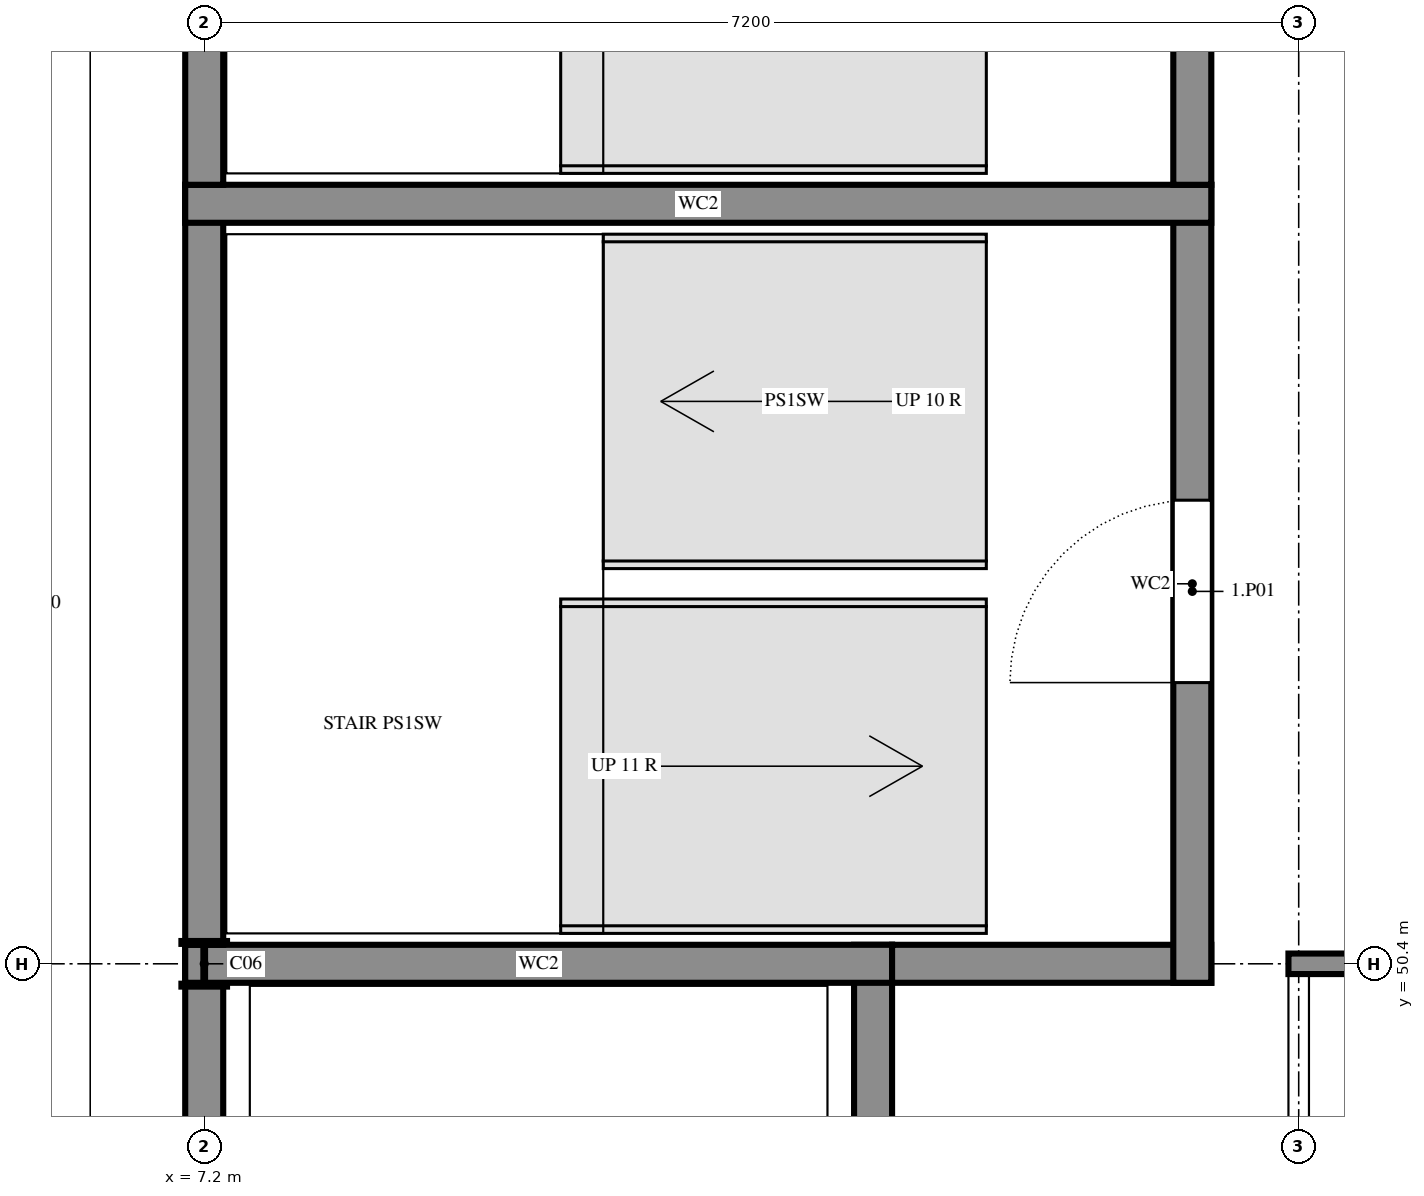
"""IFC4 building model, lengths in metres.
Left out: names, types, materials, properties, quantities, classifications, styles, units other than length and angle.
Written with IfcOpenShell. Run it as: python <this file> out.ifc"""

import sys

from ifc_helpers import new_model, si_unit, direction, frame, frame_2d, origin, origin_2d, place, context, subcontext, project, spatial, rectangle, i_section, extrude, element, fill, save


model = new_model("IFC4")
c1 = context("Model", 3, precision=1e-05, world=origin(), true_north=direction((0.0, 1.0)))
c2 = subcontext(c1, "Body", "Model", "MODEL_VIEW")
j1 = project(units=[si_unit("LENGTHUNIT", "METRE"), si_unit("PLANEANGLEUNIT", "RADIAN")], contexts=[c1])
p1 = place(None, origin())
s1 = spatial("IfcSite", under=j1, at=p1, CompositionType="ELEMENT")
p2 = place(p1, origin())
s2 = spatial("IfcBuilding", under=s1, at=p2, CompositionType="ELEMENT")
p3 = place(p2, frame((0.0, 0.0, 3.6)))
s3 = spatial("IfcBuildingStorey", under=s2, at=p3, CompositionType="ELEMENT", Elevation=3.6)
p4 = place(p3, frame((7.2, 50.4, 0.0), z_axis=(0.0, 0.0, 1.0), x_axis=(1.0, 0.0, 0.0)))
e1 = element("IfcColumn", 1, at=p4, inside=s3, PredefinedType="COLUMN", context=c2, shape_type="SweptSolid", body=[
    extrude(i_section(OverallWidth=0.3, OverallDepth=0.3, WebThickness=0.011, FlangeThickness=0.019, FilletRadius=0.027, at=origin_2d()), origin(), (0.0, 0.0, 1.0), 3.6),
])
p5 = place(p3, frame((11.6, 44.275, 0.0), z_axis=(0.0, 0.0, 1.0), x_axis=(0.0, 1.0, 0.0)))
e2 = element("IfcWall", 2, at=p5, inside=s3, PredefinedType="SHEAR", context=c2, shape_type="SweptSolid", body=[
    extrude(rectangle(XDim=6.25, YDim=0.25, at=frame_2d((3.125, 0.0))), origin(), (0.0, 0.0, 1.0), 3.6),
])
p6 = place(p5, frame((0.375, 0.0, 0.0)))
e3 = element("IfcOpeningElement", 3, at=p6, cuts=e2, PredefinedType="OPENING", context=c2, shape_type="SweptSolid", body=[
    extrude(rectangle(XDim=1.0, YDim=2.4, at=frame_2d((0.5, 1.2))), frame((0.0, 0.135, 0.0), z_axis=(0.0, -1.0, 0.0), x_axis=(1.0, 0.0, 0.0)), (0.0, 0.0, 1.0), 0.27),
])
p7 = place(p3, frame((7.2, 50.525, 0.0), z_axis=(0.0, 0.0, 1.0), x_axis=(0.0, -1.0, 0.0)))
e4 = element("IfcWall", 4, at=p7, inside=s3, PredefinedType="SHEAR", context=c2, shape_type="SweptSolid", body=[
    extrude(rectangle(XDim=6.25, YDim=0.25, at=frame_2d((3.125, 0.0))), origin(), (0.0, 0.0, 1.0), 3.6),
])
p8 = place(p3, frame((11.725, 50.4, 0.0), z_axis=(0.0, 0.0, 1.0), x_axis=(-1.0, 0.0, 0.0)))
e5 = element("IfcWall", 5, at=p8, inside=s3, PredefinedType="SHEAR", context=c2, shape_type="SweptSolid", body=[
    extrude(rectangle(XDim=4.65, YDim=0.25, at=frame_2d((2.325, 0.0))), origin(), (0.0, 0.0, 1.0), 3.6),
])
p9 = place(p3, frame((11.725, 50.4, 0.0), z_axis=(0.0, 0.0, 1.0), x_axis=(1.0, 0.0, 0.0)))
e6 = element("IfcWall", 6, at=p9, inside=s3, PredefinedType="SHEAR", context=c2, shape_type="SweptSolid", body=[
    extrude(rectangle(XDim=2.1, YDim=0.25, at=frame_2d((1.05, 0.0))), origin(), (0.0, 0.0, 1.0), 3.6),
])
p10 = place(p3, frame((13.7, 50.275, 0.0), z_axis=(0.0, 0.0, 1.0), x_axis=(0.0, 1.0, 0.0)))
e7 = element("IfcWall", 7, at=p10, inside=s3, PredefinedType="SHEAR", context=c2, shape_type="SweptSolid", body=[
    extrude(rectangle(XDim=5.25, YDim=0.25, at=frame_2d((2.625, 0.0))), origin(), (0.0, 0.0, 1.0), 3.6),
])
p11 = place(p10, frame((1.975, 0.0, 0.0)))
e8 = element("IfcOpeningElement", 8, at=p11, cuts=e7, PredefinedType="OPENING", context=c2, shape_type="SweptSolid", body=[
    extrude(rectangle(XDim=1.2, YDim=2.4, at=frame_2d((0.6, 1.2))), frame((0.0, 0.135, 0.0), z_axis=(0.0, -1.0, 0.0), x_axis=(1.0, 0.0, 0.0)), (0.0, 0.0, 1.0), 0.27),
])
p12 = place(p3, frame((7.2, 55.525, 0.0), z_axis=(0.0, 0.0, 1.0), x_axis=(0.0, -1.0, 0.0)))
e9 = element("IfcWall", 9, at=p12, inside=s3, PredefinedType="SHEAR", context=c2, shape_type="SweptSolid", body=[
    extrude(rectangle(XDim=5.0, YDim=0.25, at=frame_2d((2.5, 0.0))), origin(), (0.0, 0.0, 1.0), 3.6),
])
p13 = place(p3, frame((13.825, 55.4, 0.0), z_axis=(0.0, 0.0, 1.0), x_axis=(-1.0, 0.0, 0.0)))
e10 = element("IfcWall", 10, at=p13, inside=s3, PredefinedType="SHEAR", context=c2, shape_type="SweptSolid", body=[
    extrude(rectangle(XDim=6.75, YDim=0.25, at=frame_2d((3.375, 0.0))), origin(), (0.0, 0.0, 1.0), 3.6),
])
for number, where, z_axis, x_axis in (
    (11, (13.7, 55.525, 0.0), (0.0, 0.0, 1.0), (0.0, 1.0, 0.0)),
    (12, (7.2, 60.525, 0.0), (0.0, 0.0, 1.0), (0.0, -1.0, 0.0)),
):
    element("IfcWall", number, at=place(p3, frame(where, z_axis=z_axis, x_axis=x_axis)), inside=s3, PredefinedType="SHEAR", context=c2, shape_type="SweptSolid", body=[
        extrude(rectangle(XDim=5.0, YDim=0.25, at=frame_2d((2.5, 0.0))), origin(), (0.0, 0.0, 1.0), 3.6),
    ])
p14 = place(p3, frame((14.4, 50.333, 0.0), z_axis=(0.0, 0.0, 1.0), x_axis=(0.0, -1.0, 0.0)))
e13 = element("IfcWall", 13, at=p14, inside=s3, PredefinedType="PARTITIONING", context=c2, shape_type="SweptSolid", body=[
    extrude(rectangle(XDim=14.265, YDim=0.135, at=frame_2d((7.133, 0.0))), origin(), (0.0, 0.0, 1.0), 3.12),
])
p15 = place(p14, frame((6.35, 0.0, 0.0)))
e14 = element("IfcOpeningElement", 14, at=p15, cuts=e13, PredefinedType="OPENING", context=c2, shape_type="SweptSolid", body=[
    extrude(rectangle(XDim=1.5, YDim=2.1, at=frame_2d((0.75, 1.05))), frame((0.0, 0.077, 0.0), z_axis=(0.0, -1.0, 0.0), x_axis=(1.0, 0.0, 0.0)), (0.0, 0.0, 1.0), 0.155),
])
p16 = place(p3, frame((18.0, 50.4, 0.0), z_axis=(0.0, 0.0, 1.0), x_axis=(-1.0, 0.0, 0.0)))
e15 = element("IfcWall", 15, at=p16, inside=s3, PredefinedType="PARTITIONING", context=c2, shape_type="SweptSolid", body=[
    extrude(rectangle(XDim=3.667, YDim=0.135, at=frame_2d((1.834, 0.0))), origin(), (0.0, 0.0, 1.0), 3.09),
])
p17 = place(p11, origin())
e16 = element("IfcDoor", 16, at=p17, inside=s3, OperationType="SINGLE_SWING_RIGHT", PredefinedType="DOOR", context=c2, shape_type="SweptSolid", body=[
    extrude(rectangle(XDim=1.2, YDim=2.4, at=frame_2d((0.6, 1.2))), frame((0.0, 0.025, 0.0), z_axis=(0.0, -1.0, 0.0), x_axis=(1.0, 0.0, 0.0)), (0.0, 0.0, 1.0), 0.05),
])
fill(e8, e16)
save(model, sys.argv[1])
